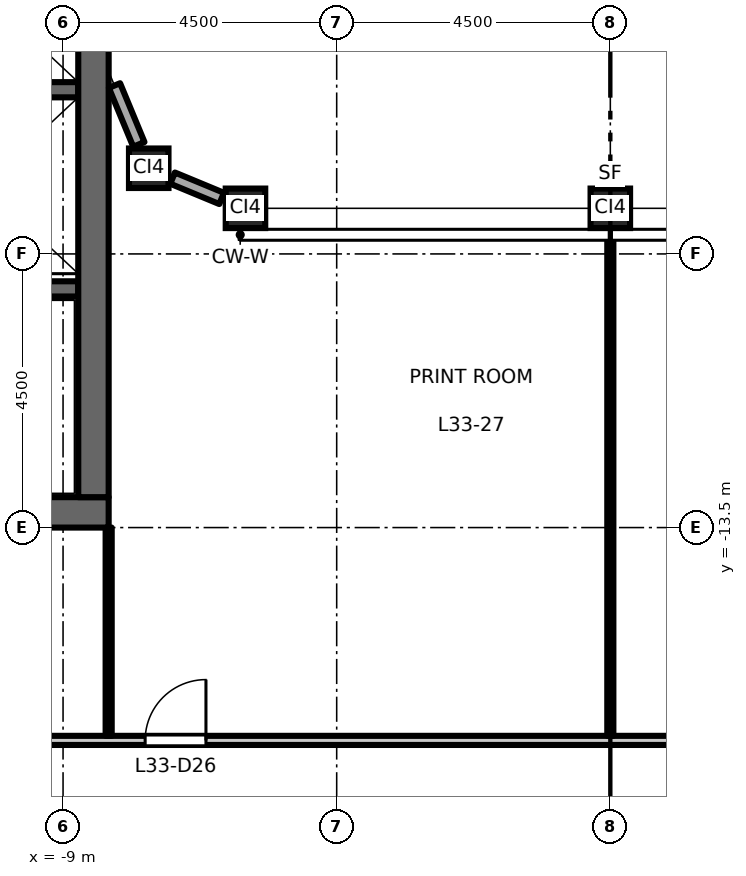
"""IFC4 building model, lengths in metres.
Left out: names, types, materials, properties, quantities, classifications, styles, units other than length and angle.
Written with IfcOpenShell. Run it as: python <this file> out.ifc"""

import sys

from ifc_helpers import new_model, si_unit, direction, frame, frame_2d, origin, origin_2d, place, context, subcontext, project, spatial, rectangle, hollow_rectangle, extrude, element, fill, save


model = new_model("IFC4")
c1 = context("Model", 3, precision=1e-05, world=origin(), true_north=direction((0.0, 1.0)))
c2 = subcontext(c1, "Body", "Model", "MODEL_VIEW")
j1 = project(units=[si_unit("LENGTHUNIT", "METRE"), si_unit("PLANEANGLEUNIT", "RADIAN")], contexts=[c1])
p1 = place(None, origin())
s1 = spatial("IfcSite", under=j1, at=p1, CompositionType="ELEMENT")
p2 = place(p1, origin())
s2 = spatial("IfcBuilding", under=s1, at=p2, CompositionType="ELEMENT")
p3 = place(p2, frame((0.0, 0.0, 154.2)))
s3 = spatial("IfcBuildingStorey", under=s2, at=p3, CompositionType="ELEMENT", Elevation=154.2)
for number, where, z_axis, x_axis in (
    (1, (-7.591, -7.591, 0.0), (0.0, 0.0, 1.0), (1.0, 0.0, 0.0)),
    (2, (-6.0, -8.25, 0.0), (0.0, 0.0, 1.0), (1.0, 0.0, 0.0)),
    (3, (0.0, -8.25, 0.0), (0.0, 0.0, 1.0), (1.0, 0.0, 0.0)),
):
    element("IfcColumn", number, at=place(p3, frame(where, z_axis=z_axis, x_axis=x_axis)), inside=s3, PredefinedType="COLUMN", context=c2, shape_type="SweptSolid", body=[
        extrude(hollow_rectangle(XDim=0.65, YDim=0.65, WallThickness=0.036, at=origin_2d()), origin(), (0.0, 0.0, 1.0), 4.5),
    ])
p4 = place(p3, frame((-8.75, -6.3, 0.0), z_axis=(0.0, 0.0, 1.0), x_axis=(-1.0, 0.0, 0.0)))
e4 = element("IfcWall", 4, at=p4, inside=s3, PredefinedType="SHEAR", context=c2, shape_type="SweptSolid", body=[
    extrude(rectangle(XDim=3.1, YDim=0.25, at=frame_2d((1.55, 0.0))), origin(), (0.0, 0.0, 1.0), 4.35),
])
p5 = place(p3, frame((-8.75, -9.575, 0.0), z_axis=(0.0, 0.0, 1.0), x_axis=(-1.0, 0.0, 0.0)))
e5 = element("IfcWall", 5, at=p5, inside=s3, PredefinedType="SHEAR", context=c2, shape_type="SweptSolid", body=[
    extrude(rectangle(XDim=8.0, YDim=0.25, at=frame_2d((4.0, 0.0))), origin(), (0.0, 0.0, 1.0), 4.35),
])
p6 = place(p5, frame((6.65, 0.0, 0.0)))
e6 = element("IfcOpeningElement", 6, at=p6, cuts=e5, PredefinedType="OPENING", context=c2, shape_type="SweptSolid", body=[
    extrude(rectangle(XDim=1.1, YDim=2.1, at=frame_2d((0.55, 1.05))), frame((0.0, 0.135, 0.0), z_axis=(0.0, -1.0, 0.0), x_axis=(1.0, 0.0, 0.0)), (0.0, 0.0, 1.0), 0.27),
])
p7 = place(p3, frame((-8.25, -13.25, 0.0), z_axis=(0.0, 0.0, 1.0), x_axis=(-1.0, 0.0, 0.0)))
e7 = element("IfcWall", 7, at=p7, inside=s3, PredefinedType="SHEAR", context=c2, shape_type="SweptSolid", body=[
    extrude(rectangle(XDim=13.5, YDim=0.5, at=frame_2d((6.75, 0.0))), origin(), (0.0, 0.0, 1.0), 4.35),
])
p8 = place(p3, frame((-8.5, -13.0, 0.0), z_axis=(0.0, 0.0, 1.0), x_axis=(0.0, 1.0, 0.0)))
e8 = element("IfcWall", 8, at=p8, inside=s3, PredefinedType="SHEAR", context=c2, shape_type="SweptSolid", body=[
    extrude(rectangle(XDim=26.0, YDim=0.5, at=frame_2d((13.0, 0.0))), origin(), (0.0, 0.0, 1.0), 4.35),
])
p9 = place(p3, frame((-8.154, -6.231, 0.0), z_axis=(0.0, 0.0, 1.0), x_axis=(0.382694858887, -0.923874799408, 0.0)))
e9 = element("IfcWall", 9, at=p9, inside=s3, PredefinedType="STANDARD", context=c2, shape_type="SweptSolid", body=[
    extrude(rectangle(XDim=1.048, YDim=0.2, at=frame_2d((0.524, 0.0))), origin(), (0.0, 0.0, 1.0), 3.826),
])
p10 = place(p3, frame((-7.199, -7.753, 0.0), z_axis=(0.0, 0.0, 1.0), x_axis=(0.923894108428, -0.382648241093, 0.0)))
e10 = element("IfcWall", 10, at=p10, inside=s3, PredefinedType="STANDARD", context=c2, shape_type="SweptSolid", body=[
    extrude(rectangle(XDim=0.873, YDim=0.2, at=frame_2d((0.437, 0.0))), origin(), (0.0, 0.0, 1.0), 3.826),
])
p11 = place(p3, frame((-21.825, -17.0, 0.0), z_axis=(0.0, 0.0, 1.0), x_axis=(1.0, 0.0, 0.0)))
e11 = element("IfcWall", 11, at=p11, inside=s3, PredefinedType="PARTITIONING", context=c2, shape_type="SweptSolid", body=[
    extrude(rectangle(XDim=43.65, YDim=0.15, at=frame_2d((21.825, 0.0))), origin(), (0.0, 0.0, 1.0), 4.35),
])
p12 = place(p11, frame((14.175, 0.0, 0.0)))
e12 = element("IfcOpeningElement", 12, at=p12, cuts=e11, PredefinedType="OPENING", context=c2, shape_type="SweptSolid", body=[
    extrude(rectangle(XDim=1.0, YDim=2.1, at=frame_2d((0.5, 1.05))), frame((0.0, 0.085, 0.0), z_axis=(0.0, -1.0, 0.0), x_axis=(1.0, 0.0, 0.0)), (0.0, 0.0, 1.0), 0.17),
])
p13 = place(p11, frame((28.425, 0.0, 0.0)))
e13 = element("IfcOpeningElement", 13, at=p13, cuts=e11, PredefinedType="OPENING", context=c2, shape_type="SweptSolid", body=[
    extrude(rectangle(XDim=1.0, YDim=2.1, at=frame_2d((0.5, 1.05))), frame((0.0, 0.085, 0.0), z_axis=(0.0, -1.0, 0.0), x_axis=(1.0, 0.0, 0.0)), (0.0, 0.0, 1.0), 0.17),
])
p14 = place(p11, frame((0.675, 0.0, 0.0)))
e14 = element("IfcOpeningElement", 14, at=p14, cuts=e11, PredefinedType="OPENING", context=c2, shape_type="SweptSolid", body=[
    extrude(rectangle(XDim=1.0, YDim=2.1, at=frame_2d((0.5, 1.05))), frame((0.0, 0.085, 0.0), z_axis=(0.0, -1.0, 0.0), x_axis=(1.0, 0.0, 0.0)), (0.0, 0.0, 1.0), 0.17),
])
p15 = place(p11, frame((41.925, 0.0, 0.0)))
e15 = element("IfcOpeningElement", 15, at=p15, cuts=e11, PredefinedType="OPENING", context=c2, shape_type="SweptSolid", body=[
    extrude(rectangle(XDim=1.0, YDim=2.1, at=frame_2d((0.5, 1.05))), frame((0.0, 0.085, 0.0), z_axis=(0.0, -1.0, 0.0), x_axis=(1.0, 0.0, 0.0)), (0.0, 0.0, 1.0), 0.17),
])
p16 = place(p3, frame((-8.25, -16.925, 0.0), z_axis=(0.0, 0.0, 1.0), x_axis=(0.0, 1.0, 0.0)))
e16 = element("IfcWall", 16, at=p16, inside=s3, PredefinedType="PARTITIONING", context=c2, shape_type="SweptSolid", body=[
    extrude(rectangle(XDim=3.425, YDim=0.1, at=frame_2d((1.712, 0.0))), origin(), (0.0, 0.0, 1.0), 4.35),
])
p17 = place(p3, frame((0.0, -16.925, 0.0), z_axis=(0.0, 0.0, 1.0), x_axis=(0.0, 1.0, 0.0)))
e17 = element("IfcWall", 17, at=p17, inside=s3, PredefinedType="PARTITIONING", context=c2, shape_type="SweptSolid", body=[
    extrude(rectangle(XDim=8.275, YDim=0.1, at=frame_2d((4.138, 0.0))), origin(), (0.0, 0.0, 1.0), 3.45),
])
p18 = place(p12, origin())
e18 = element("IfcDoor", 18, at=p18, inside=s3, OperationType="SINGLE_SWING_RIGHT", PredefinedType="DOOR", context=c2, shape_type="SweptSolid", body=[
    extrude(rectangle(XDim=1.0, YDim=2.1, at=frame_2d((0.5, 1.05))), frame((0.0, 0.025, 0.0), z_axis=(0.0, -1.0, 0.0), x_axis=(1.0, 0.0, 0.0)), (0.0, 0.0, 1.0), 0.05),
])
fill(e12, e18)
save(model, sys.argv[1])
